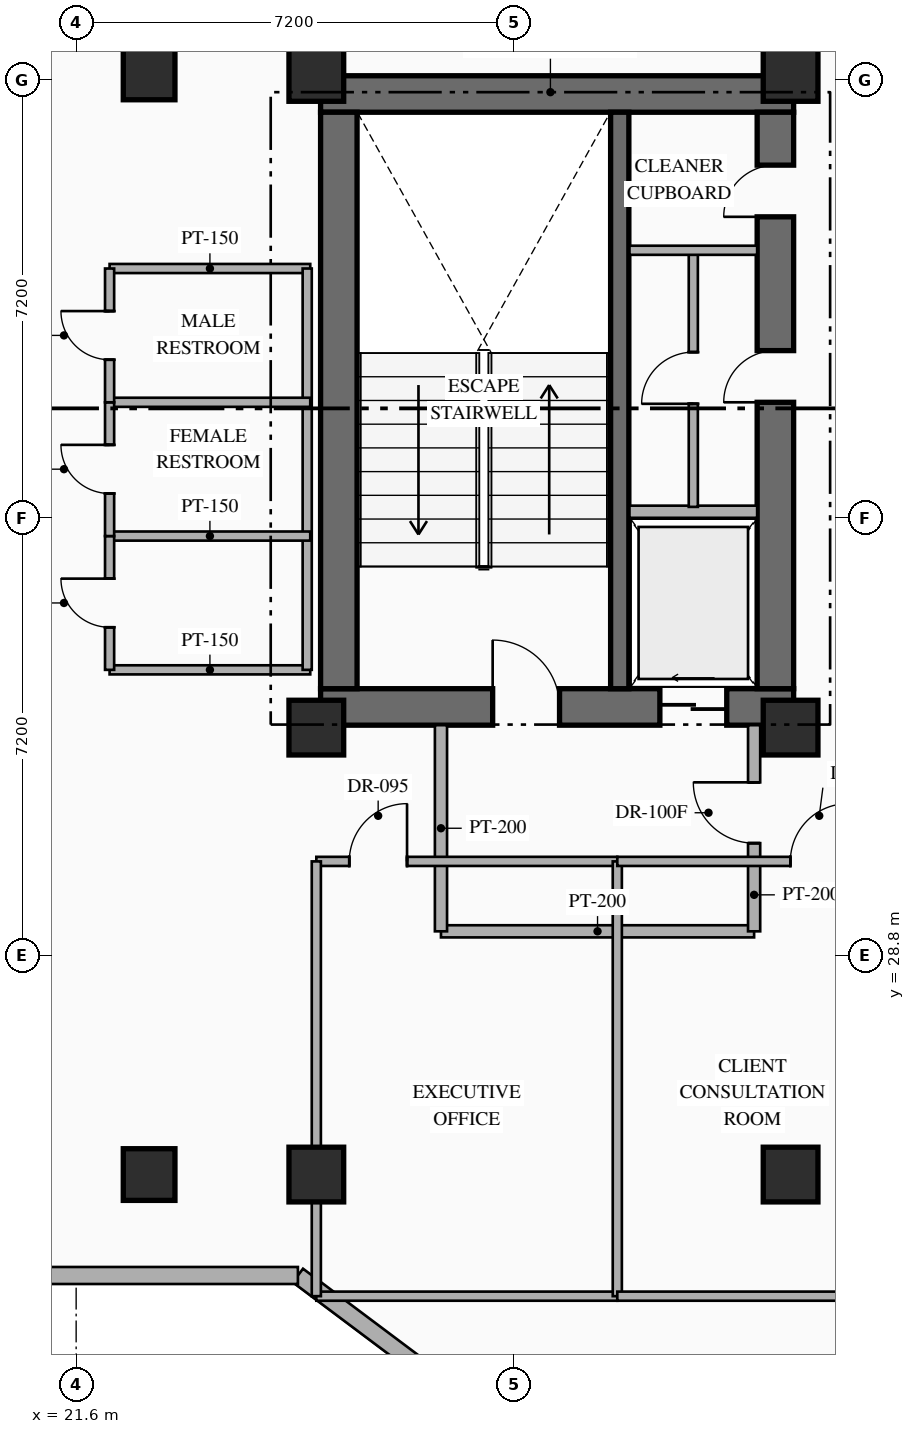
"""IFC4 building model, lengths in metres.
Left out: names, types, materials, properties, quantities, classifications, styles, units other than length and angle.
Written with IfcOpenShell. Run it as: python <this file> out.ifc"""

import sys

from ifc_helpers import new_model, si_unit, direction, frame, frame_2d, origin, origin_2d, place, context, subcontext, project, spatial, rectangle, hollow_rectangle, extrude, element, fill, save


model = new_model("IFC4")
c1 = context("Model", 3, precision=1e-05, world=origin(), true_north=direction((0.0, 1.0)))
c2 = subcontext(c1, "Body", "Model", "MODEL_VIEW")
j1 = project(units=[si_unit("LENGTHUNIT", "METRE"), si_unit("PLANEANGLEUNIT", "RADIAN")], contexts=[c1])
p1 = place(None, origin())
s1 = spatial("IfcSite", under=j1, at=p1, CompositionType="ELEMENT")
p2 = place(p1, origin())
s2 = spatial("IfcBuilding", under=s1, at=p2, CompositionType="ELEMENT")
p3 = place(p2, frame((0.0, 0.0, 108.45)))
s3 = spatial("IfcBuildingStorey", under=s2, at=p3, CompositionType="ELEMENT", Elevation=108.45)
p4 = place(p3, frame((25.62, 32.89, 0.0), z_axis=(0.0, 0.0, 1.0), x_axis=(1.0, 0.0, 0.0)))
e1 = element("IfcWall", 1, at=p4, inside=s3, PredefinedType="SHEAR", context=c2, shape_type="SweptSolid", body=[
    extrude(rectangle(XDim=7.78, YDim=0.6, at=frame_2d((3.89, 0.0))), origin(), (0.0, 0.0, 1.0), 3.6),
])
p5 = place(p4, frame((2.83, 0.0, 0.0)))
e2 = element("IfcOpeningElement", 2, at=p5, cuts=e1, PredefinedType="OPENING", context=c2, shape_type="SweptSolid", body=[
    extrude(rectangle(XDim=1.1, YDim=2.2, at=frame_2d((0.55, 1.1))), frame((0.0, 0.31, 0.0), z_axis=(0.0, -1.0, 0.0), x_axis=(1.0, 0.0, 0.0)), (0.0, 0.0, 1.0), 0.62),
])
p6 = place(p4, frame((5.58, 0.0, 0.0)))
e3 = element("IfcOpeningElement", 3, at=p6, cuts=e1, PredefinedType="OPENING", context=c2, shape_type="SweptSolid", body=[
    extrude(rectangle(XDim=1.1, YDim=2.15, at=frame_2d((0.55, 1.075))), frame((0.0, 0.31, 0.0), z_axis=(0.0, -1.0, 0.0), x_axis=(1.0, 0.0, 0.0)), (0.0, 0.0, 1.0), 0.62),
])
p7 = place(p3, frame((25.62, 42.97, 0.0), z_axis=(0.0, 0.0, 1.0), x_axis=(1.0, 0.0, 0.0)))
e4 = element("IfcWall", 4, at=p7, inside=s3, PredefinedType="SHEAR", context=c2, shape_type="SweptSolid", body=[
    extrude(rectangle(XDim=7.78, YDim=0.6, at=frame_2d((3.89, 0.0))), origin(), (0.0, 0.0, 1.0), 3.6),
])
p8 = place(p3, frame((25.92, 33.19, 0.0), z_axis=(0.0, 0.0, 1.0), x_axis=(0.0, 1.0, 0.0)))
e5 = element("IfcWall", 5, at=p8, inside=s3, PredefinedType="SHEAR", context=c2, shape_type="SweptSolid", body=[
    extrude(rectangle(XDim=9.48, YDim=0.6, at=frame_2d((4.74, 0.0))), origin(), (0.0, 0.0, 1.0), 3.6),
])
p9 = place(p3, frame((33.1, 33.19, 0.0), z_axis=(0.0, 0.0, 1.0), x_axis=(0.0, 1.0, 0.0)))
e6 = element("IfcWall", 6, at=p9, inside=s3, PredefinedType="SHEAR", context=c2, shape_type="SweptSolid", body=[
    extrude(rectangle(XDim=9.48, YDim=0.6, at=frame_2d((4.74, 0.0))), origin(), (0.0, 0.0, 1.0), 3.6),
])
p10 = place(p9, frame((4.71, 0.0, 0.0)))
e7 = element("IfcOpeningElement", 7, at=p10, cuts=e6, PredefinedType="OPENING", context=c2, shape_type="SweptSolid", body=[
    extrude(rectangle(XDim=0.85, YDim=2.08, at=frame_2d((0.425, 1.04))), frame((0.0, 0.31, 0.0), z_axis=(0.0, -1.0, 0.0), x_axis=(1.0, 0.0, 0.0)), (0.0, 0.0, 1.0), 0.62),
])
p11 = place(p9, frame((7.76, 0.0, 0.0)))
e8 = element("IfcOpeningElement", 8, at=p11, cuts=e6, PredefinedType="OPENING", context=c2, shape_type="SweptSolid", body=[
    extrude(rectangle(XDim=0.85, YDim=2.08, at=frame_2d((0.425, 1.04))), frame((0.0, 0.31, 0.0), z_axis=(0.0, -1.0, 0.0), x_axis=(1.0, 0.0, 0.0)), (0.0, 0.0, 1.0), 0.62),
])
p12 = place(p3, frame((30.54, 33.19, 0.0), z_axis=(0.0, 0.0, 1.0), x_axis=(0.0, 1.0, 0.0)))
e9 = element("IfcWall", 9, at=p12, inside=s3, PredefinedType="SHEAR", context=c2, shape_type="SweptSolid", body=[
    extrude(rectangle(XDim=9.48, YDim=0.3, at=frame_2d((4.74, 0.0))), origin(), (0.0, 0.0, 1.0), 3.6),
])
for number, where, z_axis, x_axis in (
    (10, (25.55, 32.55, 0.0), (0.0, 0.0, 1.0), (1.0, 0.0, 0.0)),
    (11, (33.35, 32.55, 0.0), (0.0, 0.0, 1.0), (1.0, 0.0, 0.0)),
    (12, (25.55, 43.3, 0.0), (0.0, 0.0, 1.0), (1.0, 0.0, 0.0)),
    (13, (33.35, 43.3, 0.0), (0.0, 0.0, 1.0), (1.0, 0.0, 0.0)),
):
    element("IfcColumn", number, at=place(p3, frame(where, z_axis=z_axis, x_axis=x_axis)), inside=s3, PredefinedType="COLUMN", context=c2, shape_type="SweptSolid", body=[
        extrude(rectangle(XDim=0.9, YDim=0.9, at=origin_2d()), origin(), (0.0, 0.0, 1.0), 3.6),
    ])
for number, where, z_axis, x_axis in (
    (14, (25.55, 25.2, 0.0), (0.0, 0.0, 1.0), (1.0, 0.0, 0.0)),
    (15, (33.35, 25.2, 0.0), (0.0, 0.0, 1.0), (1.0, 0.0, 0.0)),
):
    element("IfcColumn", number, at=place(p3, frame(where, z_axis=z_axis, x_axis=x_axis)), inside=s3, PredefinedType="COLUMN", context=c2, shape_type="SweptSolid", body=[
        extrude(hollow_rectangle(XDim=0.9, YDim=0.9, WallThickness=0.036, at=origin_2d()), origin(), (0.0, 0.0, 1.0), 3.6),
    ])
for number, where, z_axis, x_axis in (
    (16, (22.8, 25.2, 0.0), (0.0, 0.0, 1.0), (1.0, 0.0, 0.0)),
    (17, (22.8, 43.3, 0.0), (0.0, 0.0, 1.0), (1.0, 0.0, 0.0)),
):
    element("IfcColumn", number, at=place(p3, frame(where, z_axis=z_axis, x_axis=x_axis)), inside=s3, PredefinedType="COLUMN", context=c2, shape_type="SweptSolid", body=[
        extrude(hollow_rectangle(XDim=0.85, YDim=0.85, WallThickness=0.032, at=origin_2d()), origin(), (0.0, 0.0, 1.0), 3.6),
    ])
p13 = place(p3, frame((53.318, 2.487, 0.0), z_axis=(0.0, 0.0, 1.0), x_axis=(-0.800004174678, 0.599994433723, 0.0)))
e18 = element("IfcWall", 18, at=p13, inside=s3, PredefinedType="STANDARD", context=c2, shape_type="SweptSolid", body=[
    extrude(rectangle(XDim=35.089, YDim=0.28, at=frame_2d((17.544, 0.0))), origin(), (0.0, 0.0, 1.0), 3.35),
])
p14 = place(p3, frame((25.247, 23.54, 0.0), z_axis=(0.0, 0.0, 1.0), x_axis=(-1.0, 0.0, 0.0)))
e19 = element("IfcWall", 19, at=p14, inside=s3, PredefinedType="STANDARD", context=c2, shape_type="SweptSolid", body=[
    extrude(rectangle(XDim=6.747, YDim=0.28, at=frame_2d((3.374, 0.0))), origin(), (0.0, 0.0, 1.0), 3.35),
])
p15 = place(p3, frame((30.7, 36.1, 0.0), z_axis=(0.0, 0.0, 1.0), x_axis=(1.0, 0.0, 0.0)))
e20 = element("IfcWall", 20, at=p15, inside=s3, PredefinedType="STANDARD", context=c2, shape_type="SweptSolid", body=[
    extrude(rectangle(XDim=2.1, YDim=0.2, at=frame_2d((1.05, 0.0))), origin(), (0.0, 0.0, 1.0), 3.35),
])
p16 = place(p3, frame((31.75, 36.18, 0.0), z_axis=(0.0, 0.0, 1.0), x_axis=(0.0, 1.0, 0.0)))
e21 = element("IfcWall", 21, at=p16, inside=s3, PredefinedType="PARTITIONING", context=c2, shape_type="SweptSolid", body=[
    extrude(rectangle(XDim=4.24, YDim=0.15, at=frame_2d((2.12, 0.0))), origin(), (0.0, 0.0, 1.0), 3.35),
])
p17 = place(p16, frame((1.695, 0.0, 0.0)))
e22 = element("IfcOpeningElement", 22, at=p17, cuts=e21, PredefinedType="OPENING", context=c2, shape_type="SweptSolid", body=[
    extrude(rectangle(XDim=0.85, YDim=2.08, at=frame_2d((0.425, 1.04))), frame((0.0, 0.085, 0.0), z_axis=(0.0, -1.0, 0.0), x_axis=(1.0, 0.0, 0.0)), (0.0, 0.0, 1.0), 0.17),
])
p18 = place(p3, frame((30.7, 40.4, 0.0), z_axis=(0.0, 0.0, 1.0), x_axis=(1.0, 0.0, 0.0)))
e23 = element("IfcWall", 23, at=p18, inside=s3, PredefinedType="PARTITIONING", context=c2, shape_type="SweptSolid", body=[
    extrude(rectangle(XDim=2.1, YDim=0.15, at=frame_2d((1.05, 0.0))), origin(), (0.0, 0.0, 1.0), 3.35),
])
p19 = place(p3, frame((27.6, 29.2, 0.0), z_axis=(0.0, 0.0, 1.0), x_axis=(1.0, 0.0, 0.0)))
e24 = element("IfcWall", 24, at=p19, inside=s3, PredefinedType="STANDARD", context=c2, shape_type="SweptSolid", body=[
    extrude(rectangle(XDim=5.15, YDim=0.2, at=frame_2d((2.575, 0.0))), origin(), (0.0, 0.0, 1.0), 3.35),
])
p20 = place(p3, frame((27.6, 29.2, 0.0), z_axis=(0.0, 0.0, 1.0), x_axis=(0.0, 1.0, 0.0)))
e25 = element("IfcWall", 25, at=p20, inside=s3, PredefinedType="STANDARD", context=c2, shape_type="SweptSolid", body=[
    extrude(rectangle(XDim=3.39, YDim=0.2, at=frame_2d((1.695, 0.0))), origin(), (0.0, 0.0, 1.0), 3.35),
])
p21 = place(p3, frame((32.75, 29.2, 0.0), z_axis=(0.0, 0.0, 1.0), x_axis=(0.0, 1.0, 0.0)))
e26 = element("IfcWall", 26, at=p21, inside=s3, PredefinedType="STANDARD", context=c2, shape_type="SweptSolid", body=[
    extrude(rectangle(XDim=3.39, YDim=0.2, at=frame_2d((1.695, 0.0))), origin(), (0.0, 0.0, 1.0), 3.35),
])
p22 = place(p21, frame((1.45, 0.0, 0.0)))
e27 = element("IfcOpeningElement", 27, at=p22, cuts=e26, PredefinedType="OPENING", context=c2, shape_type="SweptSolid", body=[
    extrude(rectangle(XDim=1.0, YDim=2.2, at=frame_2d((0.5, 1.1))), frame((0.0, 0.11, 0.0), z_axis=(0.0, -1.0, 0.0), x_axis=(1.0, 0.0, 0.0)), (0.0, 0.0, 1.0), 0.22),
])
for number, where, z_axis, x_axis in (
    (28, (22.15, 33.5, 0.0), (0.0, 0.0, 1.0), (1.0, 0.0, 0.0)),
    (29, (22.15, 40.1, 0.0), (0.0, 0.0, 1.0), (1.0, 0.0, 0.0)),
):
    element("IfcWall", number, at=place(p3, frame(where, z_axis=z_axis, x_axis=x_axis)), inside=s3, PredefinedType="PARTITIONING", context=c2, shape_type="SweptSolid", body=[
        extrude(rectangle(XDim=3.3, YDim=0.15, at=frame_2d((1.65, 0.0))), origin(), (0.0, 0.0, 1.0), 3.35),
    ])
p23 = place(p3, frame((25.4, 33.5, 0.0), z_axis=(0.0, 0.0, 1.0), x_axis=(0.0, 1.0, 0.0)))
e30 = element("IfcWall", 30, at=p23, inside=s3, PredefinedType="PARTITIONING", context=c2, shape_type="SweptSolid", body=[
    extrude(rectangle(XDim=6.6, YDim=0.15, at=frame_2d((3.3, 0.0))), origin(), (0.0, 0.0, 1.0), 3.35),
])
for number, where, z_axis, x_axis in (
    (31, (22.15, 35.7, 0.0), (0.0, 0.0, 1.0), (1.0, 0.0, 0.0)),
    (32, (22.15, 37.9, 0.0), (0.0, 0.0, 1.0), (1.0, 0.0, 0.0)),
):
    element("IfcWall", number, at=place(p3, frame(where, z_axis=z_axis, x_axis=x_axis)), inside=s3, PredefinedType="PARTITIONING", context=c2, shape_type="SweptSolid", body=[
        extrude(rectangle(XDim=3.3, YDim=0.15, at=frame_2d((1.65, 0.0))), origin(), (0.0, 0.0, 1.0), 3.35),
    ])
p24 = place(p3, frame((22.15, 33.5, 0.0), z_axis=(0.0, 0.0, 1.0), x_axis=(0.0, 1.0, 0.0)))
e33 = element("IfcWall", 33, at=p24, inside=s3, PredefinedType="PARTITIONING", context=c2, shape_type="SweptSolid", body=[
    extrude(rectangle(XDim=2.2, YDim=0.15, at=frame_2d((1.1, 0.0))), origin(), (0.0, 0.0, 1.0), 3.35),
])
p25 = place(p24, frame((0.7, 0.0, 0.0)))
e34 = element("IfcOpeningElement", 34, at=p25, cuts=e33, PredefinedType="OPENING", context=c2, shape_type="SweptSolid", body=[
    extrude(rectangle(XDim=0.8, YDim=2.06, at=frame_2d((0.4, 1.03))), frame((0.0, 0.085, 0.0), z_axis=(0.0, -1.0, 0.0), x_axis=(1.0, 0.0, 0.0)), (0.0, 0.0, 1.0), 0.17),
])
p26 = place(p3, frame((22.15, 35.7, 0.0), z_axis=(0.0, 0.0, 1.0), x_axis=(0.0, 1.0, 0.0)))
e35 = element("IfcWall", 35, at=p26, inside=s3, PredefinedType="PARTITIONING", context=c2, shape_type="SweptSolid", body=[
    extrude(rectangle(XDim=2.2, YDim=0.15, at=frame_2d((1.1, 0.0))), origin(), (0.0, 0.0, 1.0), 3.35),
])
p27 = place(p26, frame((0.7, 0.0, 0.0)))
e36 = element("IfcOpeningElement", 36, at=p27, cuts=e35, PredefinedType="OPENING", context=c2, shape_type="SweptSolid", body=[
    extrude(rectangle(XDim=0.8, YDim=2.06, at=frame_2d((0.4, 1.03))), frame((0.0, 0.085, 0.0), z_axis=(0.0, -1.0, 0.0), x_axis=(1.0, 0.0, 0.0)), (0.0, 0.0, 1.0), 0.17),
])
p28 = place(p3, frame((22.15, 37.9, 0.0), z_axis=(0.0, 0.0, 1.0), x_axis=(0.0, 1.0, 0.0)))
e37 = element("IfcWall", 37, at=p28, inside=s3, PredefinedType="PARTITIONING", context=c2, shape_type="SweptSolid", body=[
    extrude(rectangle(XDim=2.2, YDim=0.15, at=frame_2d((1.1, 0.0))), origin(), (0.0, 0.0, 1.0), 3.35),
])
p29 = place(p28, frame((0.7, 0.0, 0.0)))
e38 = element("IfcOpeningElement", 38, at=p29, cuts=e37, PredefinedType="OPENING", context=c2, shape_type="SweptSolid", body=[
    extrude(rectangle(XDim=0.8, YDim=2.06, at=frame_2d((0.4, 1.03))), frame((0.0, 0.085, 0.0), z_axis=(0.0, -1.0, 0.0), x_axis=(1.0, 0.0, 0.0)), (0.0, 0.0, 1.0), 0.17),
])
p30 = place(p3, frame((25.55, 23.2, 0.0), z_axis=(0.0, 0.0, 1.0), x_axis=(1.0, 0.0, 0.0)))
e39 = element("IfcWall", 39, at=p30, inside=s3, PredefinedType="PARTITIONING", context=c2, shape_type="SweptSolid", body=[
    extrude(rectangle(XDim=4.95, YDim=0.15, at=frame_2d((2.475, 0.0))), origin(), (0.0, 0.0, 1.0), 3.35),
])
p31 = place(p3, frame((25.55, 30.35, 0.0), z_axis=(0.0, 0.0, 1.0), x_axis=(1.0, 0.0, 0.0)))
e40 = element("IfcWall", 40, at=p31, inside=s3, PredefinedType="PARTITIONING", context=c2, shape_type="SweptSolid", body=[
    extrude(rectangle(XDim=4.95, YDim=0.15, at=frame_2d((2.475, 0.0))), origin(), (0.0, 0.0, 1.0), 3.35),
])
p32 = place(p31, frame((0.542, 0.0, 0.0)))
e41 = element("IfcOpeningElement", 41, at=p32, cuts=e40, PredefinedType="OPENING", context=c2, shape_type="SweptSolid", body=[
    extrude(rectangle(XDim=0.95, YDim=2.15, at=frame_2d((0.475, 1.075))), frame((0.0, 0.085, 0.0), z_axis=(0.0, -1.0, 0.0), x_axis=(1.0, 0.0, 0.0)), (0.0, 0.0, 1.0), 0.17),
])
p33 = place(p3, frame((25.55, 23.2, 0.0), z_axis=(0.0, 0.0, 1.0), x_axis=(0.0, 1.0, 0.0)))
e42 = element("IfcWall", 42, at=p33, inside=s3, PredefinedType="PARTITIONING", context=c2, shape_type="SweptSolid", body=[
    extrude(rectangle(XDim=7.15, YDim=0.15, at=frame_2d((3.575, 0.0))), origin(), (0.0, 0.0, 1.0), 2.695),
])
p34 = place(p3, frame((30.5, 23.2, 0.0), z_axis=(0.0, 0.0, 1.0), x_axis=(0.0, 1.0, 0.0)))
e43 = element("IfcWall", 43, at=p34, inside=s3, PredefinedType="PARTITIONING", context=c2, shape_type="SweptSolid", body=[
    extrude(rectangle(XDim=7.15, YDim=0.15, at=frame_2d((3.575, 0.0))), origin(), (0.0, 0.0, 1.0), 3.35),
])
p35 = place(p3, frame((30.5, 23.2, 0.0), z_axis=(0.0, 0.0, 1.0), x_axis=(1.0, 0.0, 0.0)))
e44 = element("IfcWall", 44, at=p35, inside=s3, PredefinedType="PARTITIONING", context=c2, shape_type="SweptSolid", body=[
    extrude(rectangle(XDim=4.45, YDim=0.15, at=frame_2d((2.225, 0.0))), origin(), (0.0, 0.0, 1.0), 3.35),
])
p36 = place(p3, frame((30.5, 30.35, 0.0), z_axis=(0.0, 0.0, 1.0), x_axis=(1.0, 0.0, 0.0)))
e45 = element("IfcWall", 45, at=p36, inside=s3, PredefinedType="PARTITIONING", context=c2, shape_type="SweptSolid", body=[
    extrude(rectangle(XDim=4.45, YDim=0.15, at=frame_2d((2.225, 0.0))), origin(), (0.0, 0.0, 1.0), 3.35),
])
p37 = place(p36, frame((2.846, 0.0, 0.0)))
e46 = element("IfcOpeningElement", 46, at=p37, cuts=e45, PredefinedType="OPENING", context=c2, shape_type="SweptSolid", body=[
    extrude(rectangle(XDim=0.95, YDim=2.15, at=frame_2d((0.475, 1.075))), frame((0.0, 0.085, 0.0), z_axis=(0.0, -1.0, 0.0), x_axis=(1.0, 0.0, 0.0)), (0.0, 0.0, 1.0), 0.17),
])
p38 = place(p5, origin())
e47 = element("IfcDoor", 47, at=p38, inside=s3, OperationType="SINGLE_SWING_LEFT", PredefinedType="DOOR", context=c2, shape_type="SweptSolid", body=[
    extrude(rectangle(XDim=1.1, YDim=2.2, at=frame_2d((0.55, 1.1))), frame((0.0, 0.025, 0.0), z_axis=(0.0, -1.0, 0.0), x_axis=(1.0, 0.0, 0.0)), (0.0, 0.0, 1.0), 0.05),
])
fill(e2, e47)
p39 = place(p6, origin())
e48 = element("IfcDoor", 48, at=p39, inside=s3, OperationType="SLIDING_TO_LEFT", PredefinedType="USERDEFINED", context=c2, shape_type="SweptSolid", body=[
    extrude(rectangle(XDim=1.1, YDim=2.15, at=frame_2d((0.55, 1.075))), frame((0.0, 0.025, 0.0), z_axis=(0.0, -1.0, 0.0), x_axis=(1.0, 0.0, 0.0)), (0.0, 0.0, 1.0), 0.05),
])
fill(e3, e48)
p40 = place(p10, origin())
e49 = element("IfcDoor", 49, at=p40, inside=s3, OperationType="SINGLE_SWING_LEFT", PredefinedType="DOOR", context=c2, shape_type="SweptSolid", body=[
    extrude(rectangle(XDim=0.85, YDim=2.08, at=frame_2d((0.425, 1.04))), frame((0.0, 0.025, 0.0), z_axis=(0.0, -1.0, 0.0), x_axis=(1.0, 0.0, 0.0)), (0.0, 0.0, 1.0), 0.05),
])
fill(e7, e49)
p41 = place(p11, origin())
e50 = element("IfcDoor", 50, at=p41, inside=s3, OperationType="SINGLE_SWING_LEFT", PredefinedType="DOOR", context=c2, shape_type="SweptSolid", body=[
    extrude(rectangle(XDim=0.85, YDim=2.08, at=frame_2d((0.425, 1.04))), frame((0.0, 0.025, 0.0), z_axis=(0.0, -1.0, 0.0), x_axis=(1.0, 0.0, 0.0)), (0.0, 0.0, 1.0), 0.05),
])
fill(e8, e50)
p42 = place(p17, origin())
e51 = element("IfcDoor", 51, at=p42, inside=s3, OperationType="SINGLE_SWING_LEFT", PredefinedType="DOOR", context=c2, shape_type="SweptSolid", body=[
    extrude(rectangle(XDim=0.85, YDim=2.08, at=frame_2d((0.425, 1.04))), frame((0.0, 0.025, 0.0), z_axis=(0.0, -1.0, 0.0), x_axis=(1.0, 0.0, 0.0)), (0.0, 0.0, 1.0), 0.05),
])
fill(e22, e51)
p43 = place(p22, origin())
e52 = element("IfcDoor", 52, at=p43, inside=s3, OperationType="SINGLE_SWING_RIGHT", PredefinedType="DOOR", context=c2, shape_type="SweptSolid", body=[
    extrude(rectangle(XDim=1.0, YDim=2.2, at=frame_2d((0.5, 1.1))), frame((0.0, 0.025, 0.0), z_axis=(0.0, -1.0, 0.0), x_axis=(1.0, 0.0, 0.0)), (0.0, 0.0, 1.0), 0.05),
])
fill(e27, e52)
p44 = place(p25, origin())
e53 = element("IfcDoor", 53, at=p44, inside=s3, OperationType="SINGLE_SWING_RIGHT", PredefinedType="DOOR", context=c2, shape_type="SweptSolid", body=[
    extrude(rectangle(XDim=0.8, YDim=2.06, at=frame_2d((0.4, 1.03))), frame((0.0, 0.025, 0.0), z_axis=(0.0, -1.0, 0.0), x_axis=(1.0, 0.0, 0.0)), (0.0, 0.0, 1.0), 0.05),
])
fill(e34, e53)
p45 = place(p27, origin())
e54 = element("IfcDoor", 54, at=p45, inside=s3, OperationType="SINGLE_SWING_RIGHT", PredefinedType="DOOR", context=c2, shape_type="SweptSolid", body=[
    extrude(rectangle(XDim=0.8, YDim=2.06, at=frame_2d((0.4, 1.03))), frame((0.0, 0.025, 0.0), z_axis=(0.0, -1.0, 0.0), x_axis=(1.0, 0.0, 0.0)), (0.0, 0.0, 1.0), 0.05),
])
fill(e36, e54)
p46 = place(p29, origin())
e55 = element("IfcDoor", 55, at=p46, inside=s3, OperationType="SINGLE_SWING_RIGHT", PredefinedType="DOOR", context=c2, shape_type="SweptSolid", body=[
    extrude(rectangle(XDim=0.8, YDim=2.06, at=frame_2d((0.4, 1.03))), frame((0.0, 0.025, 0.0), z_axis=(0.0, -1.0, 0.0), x_axis=(1.0, 0.0, 0.0)), (0.0, 0.0, 1.0), 0.05),
])
fill(e38, e55)
p47 = place(p32, origin())
e56 = element("IfcDoor", 56, at=p47, inside=s3, OperationType="SINGLE_SWING_RIGHT", PredefinedType="DOOR", context=c2, shape_type="SweptSolid", body=[
    extrude(rectangle(XDim=0.95, YDim=2.15, at=frame_2d((0.475, 1.075))), frame((0.0, 0.025, 0.0), z_axis=(0.0, -1.0, 0.0), x_axis=(1.0, 0.0, 0.0)), (0.0, 0.0, 1.0), 0.05),
])
fill(e41, e56)
p48 = place(p37, origin())
e57 = element("IfcDoor", 57, at=p48, inside=s3, OperationType="SINGLE_SWING_RIGHT", PredefinedType="DOOR", context=c2, shape_type="SweptSolid", body=[
    extrude(rectangle(XDim=0.95, YDim=2.15, at=frame_2d((0.475, 1.075))), frame((0.0, 0.025, 0.0), z_axis=(0.0, -1.0, 0.0), x_axis=(1.0, 0.0, 0.0)), (0.0, 0.0, 1.0), 0.05),
])
fill(e46, e57)
save(model, sys.argv[1])
